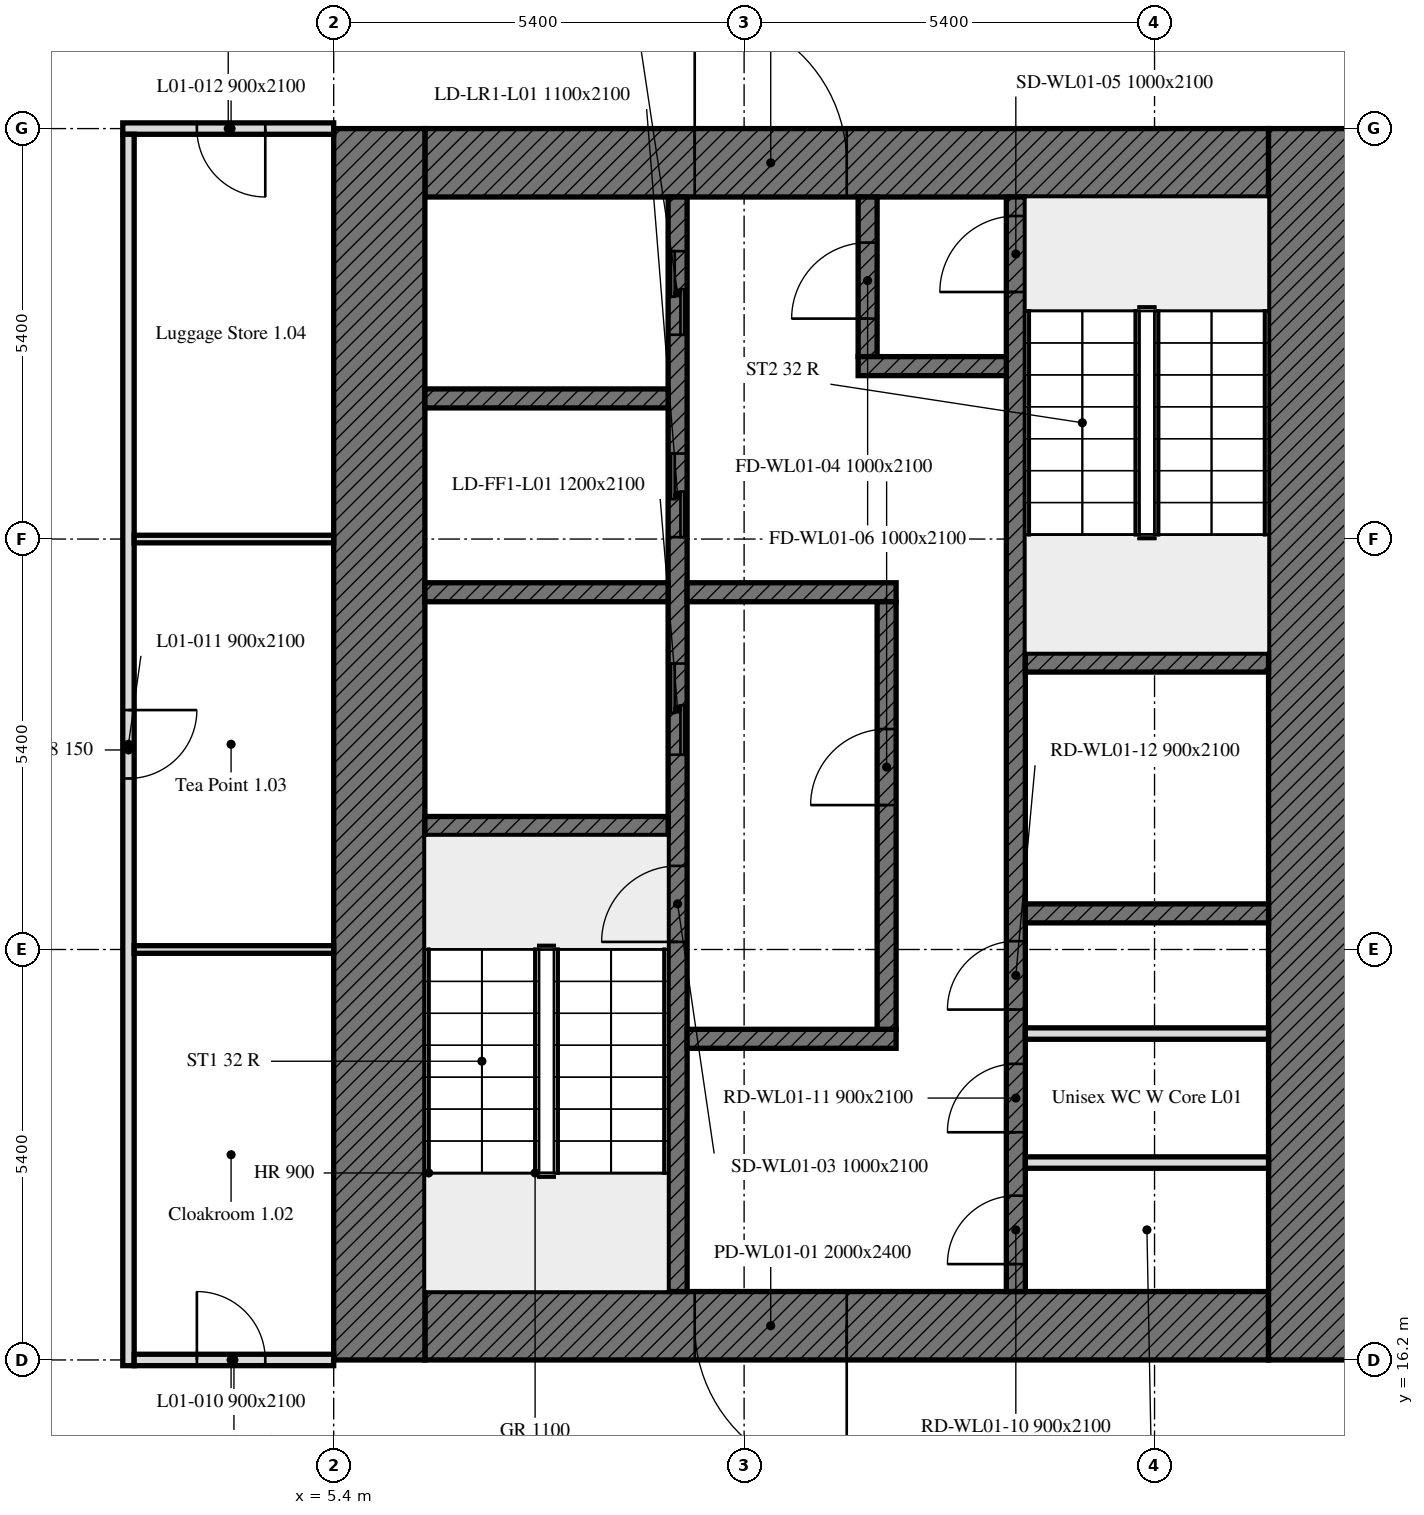
"""IFC4 building model, lengths in metres.
Left out: names, types, materials, properties, quantities, classifications, styles, units other than length and angle.
Written with IfcOpenShell. Run it as: python <this file> out.ifc"""

import sys

from ifc_helpers import new_model, si_unit, direction, frame, frame_2d, origin, place, context, subcontext, project, spatial, rectangle, extrude, element, fill, save


model = new_model("IFC4")
c1 = context("Model", 3, precision=1e-05, world=origin(), true_north=direction((0.0, 1.0)))
c2 = subcontext(c1, "Body", "Model", "MODEL_VIEW")
j1 = project(units=[si_unit("LENGTHUNIT", "METRE"), si_unit("PLANEANGLEUNIT", "RADIAN")], contexts=[c1])
p1 = place(None, origin())
s1 = spatial("IfcSite", under=j1, at=p1, CompositionType="ELEMENT")
p2 = place(p1, origin())
s2 = spatial("IfcBuilding", under=s1, at=p2, CompositionType="ELEMENT")
p3 = place(p2, frame((0.0, 0.0, 8.4)))
s3 = spatial("IfcBuildingStorey", under=s2, at=p3, CompositionType="ELEMENT", Elevation=8.4)
p4 = place(p3, frame((17.7, 16.65, 0.0), z_axis=(0.0, 0.0, 1.0), x_axis=(-1.0, 0.0, 0.0)))
e1 = element("IfcWall", 1, at=p4, inside=s3, PredefinedType="SOLIDWALL", context=c2, shape_type="SweptSolid", body=[
    extrude(rectangle(XDim=11.1, YDim=0.9, at=frame_2d((5.55, 0.0))), origin(), (0.0, 0.0, 1.0), 5.6),
])
p5 = place(p4, frame((5.55, 0.0, 0.0)))
e2 = element("IfcOpeningElement", 2, at=p5, cuts=e1, PredefinedType="OPENING", context=c2, shape_type="SweptSolid", body=[
    extrude(rectangle(XDim=2.0, YDim=2.4, at=frame_2d((1.0, 1.2))), frame((0.0, 0.45, 0.0), z_axis=(0.0, -1.0, 0.0), x_axis=(1.0, 0.0, 0.0)), (0.0, 0.0, 1.0), 0.9),
])
p6 = place(p3, frame((6.6, 31.95, 0.0), z_axis=(0.0, 0.0, 1.0), x_axis=(1.0, 0.0, 0.0)))
e3 = element("IfcWall", 3, at=p6, inside=s3, PredefinedType="SOLIDWALL", context=c2, shape_type="SweptSolid", body=[
    extrude(rectangle(XDim=11.1, YDim=0.9, at=frame_2d((5.55, 0.0))), origin(), (0.0, 0.0, 1.0), 5.6),
])
p7 = place(p6, frame((3.55, 0.0, 0.0)))
e4 = element("IfcOpeningElement", 4, at=p7, cuts=e3, PredefinedType="OPENING", context=c2, shape_type="SweptSolid", body=[
    extrude(rectangle(XDim=2.0, YDim=2.4, at=frame_2d((1.0, 1.2))), frame((0.0, 0.45, 0.0), z_axis=(0.0, -1.0, 0.0), x_axis=(1.0, 0.0, 0.0)), (0.0, 0.0, 1.0), 0.9),
])
for number, where, z_axis, x_axis in (
    (5, (6.0, 16.2, 0.0), (0.0, 0.0, 1.0), (0.0, 1.0, 0.0)),
    (6, (18.3, 32.4, 0.0), (0.0, 0.0, 1.0), (0.0, -1.0, 0.0)),
):
    element("IfcWall", number, at=place(p3, frame(where, z_axis=z_axis, x_axis=x_axis)), inside=s3, PredefinedType="SOLIDWALL", context=c2, shape_type="SweptSolid", body=[
        extrude(rectangle(XDim=16.2, YDim=1.2, at=frame_2d((8.1, 0.0))), origin(), (0.0, 0.0, 1.0), 5.6),
    ])
p8 = place(p3, frame((9.925, 17.1, 0.0), z_axis=(0.0, 0.0, 1.0), x_axis=(0.0, 1.0, 0.0)))
e7 = element("IfcWall", 7, at=p8, inside=s3, PredefinedType="SOLIDWALL", context=c2, shape_type="SweptSolid", body=[
    extrude(rectangle(XDim=14.4, YDim=0.25, at=frame_2d((7.2, 0.0))), origin(), (0.0, 0.0, 1.0), 5.6),
])
p9 = place(p8, frame((4.6, 0.0, 0.0)))
e8 = element("IfcOpeningElement", 8, at=p9, cuts=e7, PredefinedType="OPENING", context=c2, shape_type="SweptSolid", body=[
    extrude(rectangle(XDim=1.0, YDim=2.1, at=frame_2d((0.5, 1.05))), frame((0.0, 0.125, 0.0), z_axis=(0.0, -1.0, 0.0), x_axis=(1.0, 0.0, 0.0)), (0.0, 0.0, 1.0), 0.25),
])
p10 = place(p8, frame((7.062, 0.0, 0.0)))
e9 = element("IfcOpeningElement", 9, at=p10, cuts=e7, PredefinedType="OPENING", context=c2, shape_type="SweptSolid", body=[
    extrude(rectangle(XDim=1.2, YDim=2.1, at=frame_2d((0.6, 1.05))), frame((0.0, 0.125, 0.0), z_axis=(0.0, -1.0, 0.0), x_axis=(1.0, 0.0, 0.0)), (0.0, 0.0, 1.0), 0.25),
])
p11 = place(p8, frame((9.925, 0.0, 0.0)))
e10 = element("IfcOpeningElement", 10, at=p11, cuts=e7, PredefinedType="OPENING", context=c2, shape_type="SweptSolid", body=[
    extrude(rectangle(XDim=1.1, YDim=2.1, at=frame_2d((0.55, 1.05))), frame((0.0, 0.125, 0.0), z_axis=(0.0, -1.0, 0.0), x_axis=(1.0, 0.0, 0.0)), (0.0, 0.0, 1.0), 0.25),
])
p12 = place(p8, frame((12.587, 0.0, 0.0)))
e11 = element("IfcOpeningElement", 11, at=p12, cuts=e7, PredefinedType="OPENING", context=c2, shape_type="SweptSolid", body=[
    extrude(rectangle(XDim=1.1, YDim=2.1, at=frame_2d((0.55, 1.05))), frame((0.0, 0.125, 0.0), z_axis=(0.0, -1.0, 0.0), x_axis=(1.0, 0.0, 0.0)), (0.0, 0.0, 1.0), 0.25),
])
p13 = place(p3, frame((14.375, 17.1, 0.0), z_axis=(0.0, 0.0, 1.0), x_axis=(0.0, 1.0, 0.0)))
e12 = element("IfcWall", 12, at=p13, inside=s3, PredefinedType="SOLIDWALL", context=c2, shape_type="SweptSolid", body=[
    extrude(rectangle(XDim=14.4, YDim=0.25, at=frame_2d((7.2, 0.0))), origin(), (0.0, 0.0, 1.0), 5.6),
])
p14 = place(p13, frame((13.15, 0.0, 0.0)))
e13 = element("IfcOpeningElement", 13, at=p14, cuts=e12, PredefinedType="OPENING", context=c2, shape_type="SweptSolid", body=[
    extrude(rectangle(XDim=1.0, YDim=2.1, at=frame_2d((0.5, 1.05))), frame((0.0, 0.125, 0.0), z_axis=(0.0, -1.0, 0.0), x_axis=(1.0, 0.0, 0.0)), (0.0, 0.0, 1.0), 0.25),
])
p15 = place(p13, frame((0.361, 0.0, 0.0)))
e14 = element("IfcOpeningElement", 14, at=p15, cuts=e12, PredefinedType="OPENING", context=c2, shape_type="SweptSolid", body=[
    extrude(rectangle(XDim=0.9, YDim=2.1, at=frame_2d((0.45, 1.05))), frame((0.0, 0.125, 0.0), z_axis=(0.0, -1.0, 0.0), x_axis=(1.0, 0.0, 0.0)), (0.0, 0.0, 1.0), 0.25),
])
p16 = place(p13, frame((2.095, 0.0, 0.0)))
e15 = element("IfcOpeningElement", 15, at=p16, cuts=e12, PredefinedType="OPENING", context=c2, shape_type="SweptSolid", body=[
    extrude(rectangle(XDim=0.9, YDim=2.1, at=frame_2d((0.45, 1.05))), frame((0.0, 0.125, 0.0), z_axis=(0.0, -1.0, 0.0), x_axis=(1.0, 0.0, 0.0)), (0.0, 0.0, 1.0), 0.25),
])
p17 = place(p13, frame((3.709, 0.0, 0.0)))
e16 = element("IfcOpeningElement", 16, at=p17, cuts=e12, PredefinedType="OPENING", context=c2, shape_type="SweptSolid", body=[
    extrude(rectangle(XDim=0.9, YDim=2.1, at=frame_2d((0.45, 1.05))), frame((0.0, 0.125, 0.0), z_axis=(0.0, -1.0, 0.0), x_axis=(1.0, 0.0, 0.0)), (0.0, 0.0, 1.0), 0.25),
])
for number, where, z_axis, x_axis in (
    (17, (6.6, 23.225, 0.0), (0.0, 0.0, 1.0), (1.0, 0.0, 0.0)),
    (18, (14.5, 25.375, 0.0), (0.0, 0.0, 1.0), (1.0, 0.0, 0.0)),
    (19, (14.5, 22.075, 0.0), (0.0, 0.0, 1.0), (1.0, 0.0, 0.0)),
    (20, (6.6, 26.3, 0.0), (0.0, 0.0, 1.0), (1.0, 0.0, 0.0)),
):
    element("IfcWall", number, at=place(p3, frame(where, z_axis=z_axis, x_axis=x_axis)), inside=s3, PredefinedType="SOLIDWALL", context=c2, shape_type="SweptSolid", body=[
        extrude(rectangle(XDim=3.2, YDim=0.25, at=frame_2d((1.6, 0.0))), origin(), (0.0, 0.0, 1.0), 5.6),
    ])
for number, where, z_axis, x_axis in (
    (21, (10.05, 26.3, 0.0), (0.0, 0.0, 1.0), (1.0, 0.0, 0.0)),
    (22, (10.05, 20.425, 0.0), (0.0, 0.0, 1.0), (1.0, 0.0, 0.0)),
):
    element("IfcWall", number, at=place(p3, frame(where, z_axis=z_axis, x_axis=x_axis)), inside=s3, PredefinedType="SOLIDWALL", context=c2, shape_type="SweptSolid", body=[
        extrude(rectangle(XDim=2.75, YDim=0.25, at=frame_2d((1.375, 0.0))), origin(), (0.0, 0.0, 1.0), 5.6),
    ])
p18 = place(p3, frame((12.425, 29.4, 0.0), z_axis=(0.0, 0.0, 1.0), x_axis=(0.0, 1.0, 0.0)))
e23 = element("IfcWall", 23, at=p18, inside=s3, PredefinedType="SOLIDWALL", context=c2, shape_type="SweptSolid", body=[
    extrude(rectangle(XDim=2.1, YDim=0.25, at=frame_2d((1.05, 0.0))), origin(), (0.0, 0.0, 1.0), 5.6),
])
p19 = place(p18, frame((0.5, 0.0, 0.0)))
e24 = element("IfcOpeningElement", 24, at=p19, cuts=e23, PredefinedType="OPENING", context=c2, shape_type="SweptSolid", body=[
    extrude(rectangle(XDim=1.0, YDim=2.1, at=frame_2d((0.5, 1.05))), frame((0.0, 0.125, 0.0), z_axis=(0.0, -1.0, 0.0), x_axis=(1.0, 0.0, 0.0)), (0.0, 0.0, 1.0), 0.25),
])
p20 = place(p3, frame((12.3, 29.275, 0.0), z_axis=(0.0, 0.0, 1.0), x_axis=(1.0, 0.0, 0.0)))
e25 = element("IfcWall", 25, at=p20, inside=s3, PredefinedType="SOLIDWALL", context=c2, shape_type="SweptSolid", body=[
    extrude(rectangle(XDim=1.95, YDim=0.25, at=frame_2d((0.975, 0.0))), origin(), (0.0, 0.0, 1.0), 5.6),
])
p21 = place(p3, frame((12.675, 20.55, 0.0), z_axis=(0.0, 0.0, 1.0), x_axis=(0.0, 1.0, 0.0)))
e26 = element("IfcWall", 26, at=p21, inside=s3, PredefinedType="SOLIDWALL", context=c2, shape_type="SweptSolid", body=[
    extrude(rectangle(XDim=5.625, YDim=0.25, at=frame_2d((2.812, 0.0))), origin(), (0.0, 0.0, 1.0), 5.6),
])
p22 = place(p21, frame((2.95, 0.0, 0.0)))
e27 = element("IfcOpeningElement", 27, at=p22, cuts=e26, PredefinedType="OPENING", context=c2, shape_type="SweptSolid", body=[
    extrude(rectangle(XDim=1.0, YDim=2.1, at=frame_2d((0.5, 1.05))), frame((0.0, 0.125, 0.0), z_axis=(0.0, -1.0, 0.0), x_axis=(1.0, 0.0, 0.0)), (0.0, 0.0, 1.0), 0.25),
])
p23 = place(p3, frame((6.6, 28.85, 0.0), z_axis=(0.0, 0.0, 1.0), x_axis=(1.0, 0.0, 0.0)))
e28 = element("IfcWall", 28, at=p23, inside=s3, PredefinedType="SOLIDWALL", context=c2, shape_type="SweptSolid", body=[
    extrude(rectangle(XDim=3.2, YDim=0.25, at=frame_2d((1.6, 0.0))), origin(), (0.0, 0.0, 1.0), 5.6),
])
for number, where, z_axis, x_axis in (
    (29, (14.5, 18.797, 0.0), (0.0, 0.0, 1.0), (1.0, 0.0, 0.0)),
    (30, (14.5, 20.494, 0.0), (0.0, 0.0, 1.0), (1.0, 0.0, 0.0)),
):
    element("IfcWall", number, at=place(p3, frame(where, z_axis=z_axis, x_axis=x_axis)), inside=s3, PredefinedType="PARTITIONING", context=c2, shape_type="SweptSolid", body=[
        extrude(rectangle(XDim=3.2, YDim=0.15, at=frame_2d((1.6, 0.0))), origin(), (0.0, 0.0, 1.0), 5.6),
    ])
p24 = place(p3, frame((5.4, 32.4, 0.0), z_axis=(0.0, 0.0, 1.0), x_axis=(-1.0, 0.0, 0.0)))
e31 = element("IfcWall", 31, at=p24, inside=s3, PredefinedType="PARTITIONING", context=c2, shape_type="SweptSolid", body=[
    extrude(rectangle(XDim=2.775, YDim=0.15, at=frame_2d((1.387, 0.0))), origin(), (0.0, 0.0, 1.0), 4.85),
])
p25 = place(p24, frame((0.9, 0.0, 0.0)))
e32 = element("IfcOpeningElement", 32, at=p25, cuts=e31, PredefinedType="OPENING", context=c2, shape_type="SweptSolid", body=[
    extrude(rectangle(XDim=0.9, YDim=2.1, at=frame_2d((0.45, 1.05))), frame((0.0, 0.075, 0.0), z_axis=(0.0, -1.0, 0.0), x_axis=(1.0, 0.0, 0.0)), (0.0, 0.0, 1.0), 0.15),
])
p26 = place(p3, frame((2.7, 32.325, 0.0), z_axis=(0.0, 0.0, 1.0), x_axis=(0.0, -1.0, 0.0)))
e33 = element("IfcWall", 33, at=p26, inside=s3, PredefinedType="PARTITIONING", context=c2, shape_type="SweptSolid", body=[
    extrude(rectangle(XDim=16.2, YDim=0.15, at=frame_2d((8.1, 0.0))), origin(), (0.0, 0.0, 1.0), 4.85),
])
p27 = place(p26, frame((7.575, 0.0, 0.0)))
e34 = element("IfcOpeningElement", 34, at=p27, cuts=e33, PredefinedType="OPENING", context=c2, shape_type="SweptSolid", body=[
    extrude(rectangle(XDim=0.9, YDim=2.1, at=frame_2d((0.45, 1.05))), frame((0.0, 0.075, 0.0), z_axis=(0.0, -1.0, 0.0), x_axis=(1.0, 0.0, 0.0)), (0.0, 0.0, 1.0), 0.15),
])
p28 = place(p3, frame((2.775, 16.2, 0.0), z_axis=(0.0, 0.0, 1.0), x_axis=(1.0, 0.0, 0.0)))
e35 = element("IfcWall", 35, at=p28, inside=s3, PredefinedType="PARTITIONING", context=c2, shape_type="SweptSolid", body=[
    extrude(rectangle(XDim=2.625, YDim=0.15, at=frame_2d((1.312, 0.0))), origin(), (0.0, 0.0, 1.0), 4.85),
])
p29 = place(p28, frame((0.825, 0.0, 0.0)))
e36 = element("IfcOpeningElement", 36, at=p29, cuts=e35, PredefinedType="OPENING", context=c2, shape_type="SweptSolid", body=[
    extrude(rectangle(XDim=0.9, YDim=2.1, at=frame_2d((0.45, 1.05))), frame((0.0, 0.075, 0.0), z_axis=(0.0, -1.0, 0.0), x_axis=(1.0, 0.0, 0.0)), (0.0, 0.0, 1.0), 0.15),
])
for number, where, z_axis, x_axis in (
    (37, (5.4, 21.6, 0.0), (0.0, 0.0, 1.0), (-1.0, 0.0, 0.0)),
    (38, (5.4, 27.0, 0.0), (0.0, 0.0, 1.0), (-1.0, 0.0, 0.0)),
):
    element("IfcWall", number, at=place(p3, frame(where, z_axis=z_axis, x_axis=x_axis)), inside=s3, PredefinedType="PARTITIONING", context=c2, shape_type="SweptSolid", body=[
        extrude(rectangle(XDim=2.625, YDim=0.1, at=frame_2d((1.312, 0.0))), origin(), (0.0, 0.0, 1.0), 4.85),
    ])
p30 = place(p5, origin())
e39 = element("IfcDoor", 39, at=p30, inside=s3, OperationType="DOUBLE_DOOR_SINGLE_SWING", PredefinedType="DOOR", context=c2, shape_type="SweptSolid", body=[
    extrude(rectangle(XDim=2.0, YDim=2.4, at=frame_2d((1.0, 1.2))), frame((0.0, 0.025, 0.0), z_axis=(0.0, -1.0, 0.0), x_axis=(1.0, 0.0, 0.0)), (0.0, 0.0, 1.0), 0.05),
])
fill(e2, e39)
p31 = place(p7, origin())
e40 = element("IfcDoor", 40, at=p31, inside=s3, OperationType="DOUBLE_DOOR_SINGLE_SWING", PredefinedType="DOOR", context=c2, shape_type="SweptSolid", body=[
    extrude(rectangle(XDim=2.0, YDim=2.4, at=frame_2d((1.0, 1.2))), frame((0.0, 0.025, 0.0), z_axis=(0.0, -1.0, 0.0), x_axis=(1.0, 0.0, 0.0)), (0.0, 0.0, 1.0), 0.05),
])
fill(e4, e40)
p32 = place(p9, origin())
e41 = element("IfcDoor", 41, at=p32, inside=s3, OperationType="SINGLE_SWING_LEFT", PredefinedType="DOOR", context=c2, shape_type="SweptSolid", body=[
    extrude(rectangle(XDim=1.0, YDim=2.1, at=frame_2d((0.5, 1.05))), frame((0.0, 0.025, 0.0), z_axis=(0.0, -1.0, 0.0), x_axis=(1.0, 0.0, 0.0)), (0.0, 0.0, 1.0), 0.05),
])
fill(e8, e41)
p33 = place(p22, origin())
e42 = element("IfcDoor", 42, at=p33, inside=s3, OperationType="SINGLE_SWING_LEFT", PredefinedType="DOOR", context=c2, shape_type="SweptSolid", body=[
    extrude(rectangle(XDim=1.0, YDim=2.1, at=frame_2d((0.5, 1.05))), frame((0.0, 0.025, 0.0), z_axis=(0.0, -1.0, 0.0), x_axis=(1.0, 0.0, 0.0)), (0.0, 0.0, 1.0), 0.05),
])
fill(e27, e42)
p34 = place(p14, origin())
e43 = element("IfcDoor", 43, at=p34, inside=s3, OperationType="SINGLE_SWING_LEFT", PredefinedType="DOOR", context=c2, shape_type="SweptSolid", body=[
    extrude(rectangle(XDim=1.0, YDim=2.1, at=frame_2d((0.5, 1.05))), frame((0.0, 0.025, 0.0), z_axis=(0.0, -1.0, 0.0), x_axis=(1.0, 0.0, 0.0)), (0.0, 0.0, 1.0), 0.05),
])
fill(e13, e43)
p35 = place(p19, origin())
e44 = element("IfcDoor", 44, at=p35, inside=s3, OperationType="SINGLE_SWING_LEFT", PredefinedType="DOOR", context=c2, shape_type="SweptSolid", body=[
    extrude(rectangle(XDim=1.0, YDim=2.1, at=frame_2d((0.5, 1.05))), frame((0.0, 0.025, 0.0), z_axis=(0.0, -1.0, 0.0), x_axis=(1.0, 0.0, 0.0)), (0.0, 0.0, 1.0), 0.05),
])
fill(e24, e44)
p36 = place(p10, origin())
e45 = element("IfcDoor", 45, at=p36, inside=s3, OperationType="DOUBLE_DOOR_SLIDING", PredefinedType="DOOR", context=c2, shape_type="SweptSolid", body=[
    extrude(rectangle(XDim=1.2, YDim=2.1, at=frame_2d((0.6, 1.05))), frame((0.0, 0.025, 0.0), z_axis=(0.0, -1.0, 0.0), x_axis=(1.0, 0.0, 0.0)), (0.0, 0.0, 1.0), 0.05),
])
fill(e9, e45)
p37 = place(p11, origin())
e46 = element("IfcDoor", 46, at=p37, inside=s3, OperationType="DOUBLE_DOOR_SLIDING", PredefinedType="DOOR", context=c2, shape_type="SweptSolid", body=[
    extrude(rectangle(XDim=1.1, YDim=2.1, at=frame_2d((0.55, 1.05))), frame((0.0, 0.025, 0.0), z_axis=(0.0, -1.0, 0.0), x_axis=(1.0, 0.0, 0.0)), (0.0, 0.0, 1.0), 0.05),
])
fill(e10, e46)
p38 = place(p12, origin())
e47 = element("IfcDoor", 47, at=p38, inside=s3, OperationType="DOUBLE_DOOR_SLIDING", PredefinedType="DOOR", context=c2, shape_type="SweptSolid", body=[
    extrude(rectangle(XDim=1.1, YDim=2.1, at=frame_2d((0.55, 1.05))), frame((0.0, 0.025, 0.0), z_axis=(0.0, -1.0, 0.0), x_axis=(1.0, 0.0, 0.0)), (0.0, 0.0, 1.0), 0.05),
])
fill(e11, e47)
p39 = place(p15, origin())
e48 = element("IfcDoor", 48, at=p39, inside=s3, OperationType="SINGLE_SWING_LEFT", PredefinedType="DOOR", context=c2, shape_type="SweptSolid", body=[
    extrude(rectangle(XDim=0.9, YDim=2.1, at=frame_2d((0.45, 1.05))), frame((0.0, 0.025, 0.0), z_axis=(0.0, -1.0, 0.0), x_axis=(1.0, 0.0, 0.0)), (0.0, 0.0, 1.0), 0.05),
])
fill(e14, e48)
p40 = place(p16, origin())
e49 = element("IfcDoor", 49, at=p40, inside=s3, OperationType="SINGLE_SWING_LEFT", PredefinedType="DOOR", context=c2, shape_type="SweptSolid", body=[
    extrude(rectangle(XDim=0.9, YDim=2.1, at=frame_2d((0.45, 1.05))), frame((0.0, 0.025, 0.0), z_axis=(0.0, -1.0, 0.0), x_axis=(1.0, 0.0, 0.0)), (0.0, 0.0, 1.0), 0.05),
])
fill(e15, e49)
p41 = place(p17, origin())
e50 = element("IfcDoor", 50, at=p41, inside=s3, OperationType="SINGLE_SWING_LEFT", PredefinedType="DOOR", context=c2, shape_type="SweptSolid", body=[
    extrude(rectangle(XDim=0.9, YDim=2.1, at=frame_2d((0.45, 1.05))), frame((0.0, 0.025, 0.0), z_axis=(0.0, -1.0, 0.0), x_axis=(1.0, 0.0, 0.0)), (0.0, 0.0, 1.0), 0.05),
])
fill(e16, e50)
p42 = place(p29, origin())
e51 = element("IfcDoor", 51, at=p42, inside=s3, OperationType="SINGLE_SWING_RIGHT", PredefinedType="DOOR", context=c2, shape_type="SweptSolid", body=[
    extrude(rectangle(XDim=0.9, YDim=2.1, at=frame_2d((0.45, 1.05))), frame((0.0, 0.025, 0.0), z_axis=(0.0, -1.0, 0.0), x_axis=(1.0, 0.0, 0.0)), (0.0, 0.0, 1.0), 0.05),
])
fill(e36, e51)
p43 = place(p27, origin())
e52 = element("IfcDoor", 52, at=p43, inside=s3, OperationType="SINGLE_SWING_RIGHT", PredefinedType="DOOR", context=c2, shape_type="SweptSolid", body=[
    extrude(rectangle(XDim=0.9, YDim=2.1, at=frame_2d((0.45, 1.05))), frame((0.0, 0.025, 0.0), z_axis=(0.0, -1.0, 0.0), x_axis=(1.0, 0.0, 0.0)), (0.0, 0.0, 1.0), 0.05),
])
fill(e34, e52)
p44 = place(p25, origin())
e53 = element("IfcDoor", 53, at=p44, inside=s3, OperationType="SINGLE_SWING_RIGHT", PredefinedType="DOOR", context=c2, shape_type="SweptSolid", body=[
    extrude(rectangle(XDim=0.9, YDim=2.1, at=frame_2d((0.45, 1.05))), frame((0.0, 0.025, 0.0), z_axis=(0.0, -1.0, 0.0), x_axis=(1.0, 0.0, 0.0)), (0.0, 0.0, 1.0), 0.05),
])
fill(e32, e53)
save(model, sys.argv[1])
